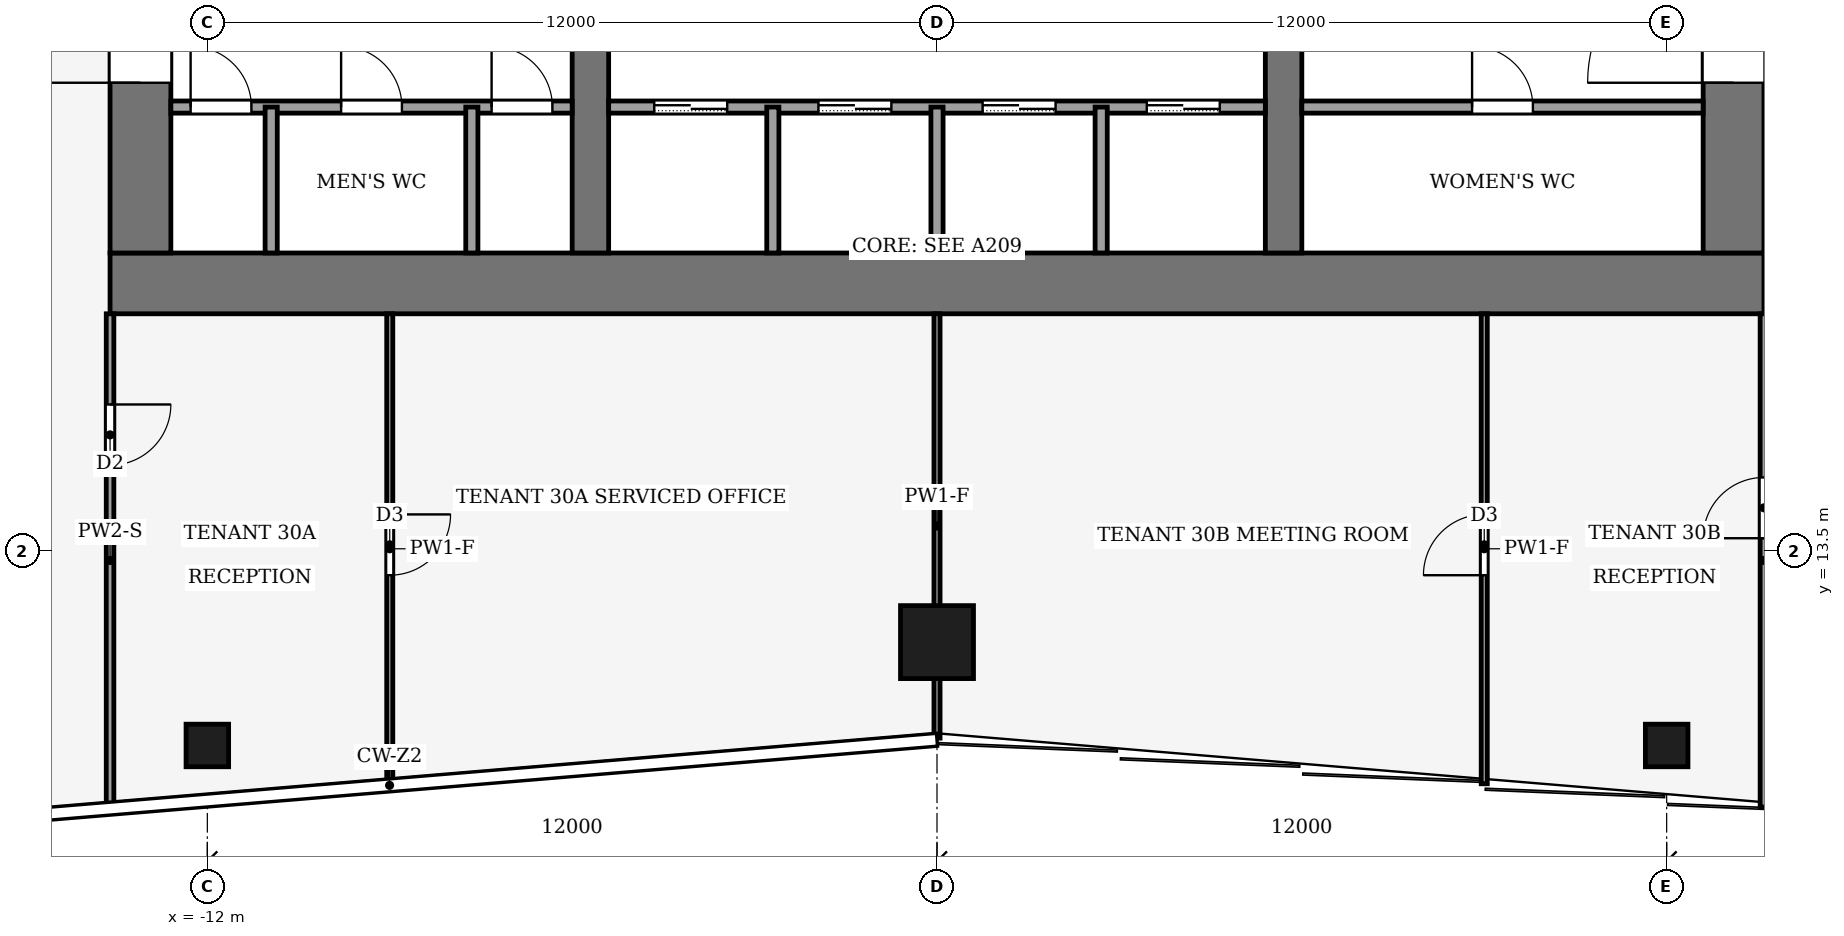
"""IFC4 building model, lengths in metres.
Left out: names, types, materials, properties, quantities, classifications, styles, units other than length and angle.
Written with IfcOpenShell. Run it as: python <this file> out.ifc"""

import sys

from ifc_helpers import new_model, si_unit, direction, frame, frame_2d, origin, origin_2d, place, context, subcontext, project, spatial, rectangle, hollow_rectangle, extrude, element, fill, save


model = new_model("IFC4")
c1 = context("Model", 3, precision=1e-05, world=origin(), true_north=direction((0.0, 1.0)))
c2 = subcontext(c1, "Body", "Model", "MODEL_VIEW")
j1 = project(units=[si_unit("LENGTHUNIT", "METRE"), si_unit("PLANEANGLEUNIT", "RADIAN")], contexts=[c1])
p1 = place(None, origin())
s1 = spatial("IfcSite", under=j1, at=p1, CompositionType="ELEMENT")
p2 = place(p1, origin())
s2 = spatial("IfcBuilding", under=s1, at=p2, CompositionType="ELEMENT")
p3 = place(p2, frame((0.0, 0.0, 134.0)))
s3 = spatial("IfcBuildingStorey", under=s2, at=p3, CompositionType="ELEMENT", Elevation=134.0)
p4 = place(p3, frame((-13.6, 17.9, -0.13), z_axis=(0.0, 0.0, 1.0), x_axis=(1.0, 0.0, 0.0)))
e1 = element("IfcWall", 1, at=p4, inside=s3, PredefinedType="SHEAR", context=c2, shape_type="SweptSolid", body=[
    extrude(rectangle(XDim=27.2, YDim=1.0, at=frame_2d((13.6, 0.0))), origin(), (0.0, 0.0, 1.0), 4.0),
])
p5 = place(p3, frame((-13.1, 18.4, -0.13), z_axis=(0.0, 0.0, 1.0), x_axis=(0.0, 1.0, 0.0)))
e2 = element("IfcWall", 2, at=p5, inside=s3, PredefinedType="SHEAR", context=c2, shape_type="SweptSolid", body=[
    extrude(rectangle(XDim=19.2, YDim=1.0, at=frame_2d((9.6, 0.0))), origin(), (0.0, 0.0, 1.0), 4.0),
])
p6 = place(p5, frame((2.8, 0.0, 0.13)))
e3 = element("IfcOpeningElement", 3, at=p6, cuts=e2, PredefinedType="OPENING", context=c2, shape_type="SweptSolid", body=[
    extrude(rectangle(XDim=2.4, YDim=2.4, at=frame_2d((1.2, 1.2))), frame((0.0, 0.51, 0.0), z_axis=(0.0, -1.0, 0.0), x_axis=(1.0, 0.0, 0.0)), (0.0, 0.0, 1.0), 1.02),
])
p7 = place(p5, frame((13.4, 0.0, 0.13)))
e4 = element("IfcOpeningElement", 4, at=p7, cuts=e2, PredefinedType="OPENING", context=c2, shape_type="SweptSolid", body=[
    extrude(rectangle(XDim=1.4, YDim=2.2, at=frame_2d((0.7, 1.1))), frame((0.0, 0.51, 0.0), z_axis=(0.0, -1.0, 0.0), x_axis=(1.0, 0.0, 0.0)), (0.0, 0.0, 1.0), 1.02),
])
p8 = place(p3, frame((13.1, 18.4, -0.13), z_axis=(0.0, 0.0, 1.0), x_axis=(0.0, 1.0, 0.0)))
e5 = element("IfcWall", 5, at=p8, inside=s3, PredefinedType="SHEAR", context=c2, shape_type="SweptSolid", body=[
    extrude(rectangle(XDim=19.2, YDim=1.0, at=frame_2d((9.6, 0.0))), origin(), (0.0, 0.0, 1.0), 4.0),
])
p9 = place(p8, frame((2.8, 0.0, 0.13)))
e6 = element("IfcOpeningElement", 6, at=p9, cuts=e5, PredefinedType="OPENING", context=c2, shape_type="SweptSolid", body=[
    extrude(rectangle(XDim=2.4, YDim=2.4, at=frame_2d((1.2, 1.2))), frame((0.0, 0.51, 0.0), z_axis=(0.0, -1.0, 0.0), x_axis=(1.0, 0.0, 0.0)), (0.0, 0.0, 1.0), 1.02),
])
p10 = place(p8, frame((13.3, 0.0, 0.13)))
e7 = element("IfcOpeningElement", 7, at=p10, cuts=e5, PredefinedType="OPENING", context=c2, shape_type="SweptSolid", body=[
    extrude(rectangle(XDim=2.4, YDim=2.4, at=frame_2d((1.2, 1.2))), frame((0.0, 0.51, 0.0), z_axis=(0.0, -1.0, 0.0), x_axis=(1.0, 0.0, 0.0)), (0.0, 0.0, 1.0), 1.02),
])
p11 = place(p3, frame((-5.7, 18.4, -0.13), z_axis=(0.0, 0.0, 1.0), x_axis=(0.0, 1.0, 0.0)))
e8 = element("IfcWall", 8, at=p11, inside=s3, PredefinedType="SHEAR", context=c2, shape_type="SweptSolid", body=[
    extrude(rectangle(XDim=19.2, YDim=0.6, at=frame_2d((9.6, 0.0))), origin(), (0.0, 0.0, 1.0), 4.0),
])
p12 = place(p11, frame((8.35, 0.0, 0.13)))
e9 = element("IfcOpeningElement", 9, at=p12, cuts=e8, PredefinedType="OPENING", context=c2, shape_type="SweptSolid", body=[
    extrude(rectangle(XDim=0.9, YDim=2.1, at=frame_2d((0.45, 1.05))), frame((0.0, 0.31, 0.0), z_axis=(0.0, -1.0, 0.0), x_axis=(1.0, 0.0, 0.0)), (0.0, 0.0, 1.0), 0.62),
])
p13 = place(p3, frame((5.7, 18.4, -0.13), z_axis=(0.0, 0.0, 1.0), x_axis=(0.0, 1.0, 0.0)))
e10 = element("IfcWall", 10, at=p13, inside=s3, PredefinedType="SHEAR", context=c2, shape_type="SweptSolid", body=[
    extrude(rectangle(XDim=19.2, YDim=0.6, at=frame_2d((9.6, 0.0))), origin(), (0.0, 0.0, 1.0), 4.0),
])
p14 = place(p13, frame((8.35, 0.0, 0.13)))
e11 = element("IfcOpeningElement", 11, at=p14, cuts=e10, PredefinedType="OPENING", context=c2, shape_type="SweptSolid", body=[
    extrude(rectangle(XDim=0.9, YDim=2.1, at=frame_2d((0.45, 1.05))), frame((0.0, 0.31, 0.0), z_axis=(0.0, -1.0, 0.0), x_axis=(1.0, 0.0, 0.0)), (0.0, 0.0, 1.0), 0.62),
])
p15 = place(p13, frame((13.3, 0.0, 0.13)))
e12 = element("IfcOpeningElement", 12, at=p15, cuts=e10, PredefinedType="OPENING", context=c2, shape_type="SweptSolid", body=[
    extrude(rectangle(XDim=2.4, YDim=2.4, at=frame_2d((1.2, 1.2))), frame((0.0, 0.31, 0.0), z_axis=(0.0, -1.0, 0.0), x_axis=(1.0, 0.0, 0.0)), (0.0, 0.0, 1.0), 0.62),
])
p16 = place(p3, frame((0.0, 12.0, 0.0), z_axis=(0.0, 0.0, 1.0), x_axis=(1.0, 0.0, 0.0)))
e13 = element("IfcColumn", 13, at=p16, inside=s3, PredefinedType="COLUMN", context=c2, shape_type="SweptSolid", body=[
    extrude(hollow_rectangle(XDim=1.2, YDim=1.2, WallThickness=0.07, at=origin_2d()), origin(), (0.0, 0.0, 1.0), 4.0),
])
for number, where, z_axis, x_axis in (
    (14, (-12.0, 10.3, 0.0), (0.0, 0.0, 1.0), (1.0, 0.0, 0.0)),
    (15, (12.0, 10.3, 0.0), (0.0, 0.0, 1.0), (1.0, 0.0, 0.0)),
):
    element("IfcColumn", number, at=place(p3, frame(where, z_axis=z_axis, x_axis=x_axis)), inside=s3, PredefinedType="COLUMN", context=c2, shape_type="SweptSolid", body=[
        extrude(hollow_rectangle(XDim=0.7, YDim=0.7, WallThickness=0.03, at=origin_2d()), origin(), (0.0, 0.0, 1.0), 4.0),
    ])
p17 = place(p3, frame((-12.6, 20.8, 0.0), z_axis=(0.0, 0.0, 1.0), x_axis=(1.0, 0.0, 0.0)))
e16 = element("IfcWall", 16, at=p17, inside=s3, PredefinedType="PARTITIONING", context=c2, shape_type="SweptSolid", body=[
    extrude(rectangle(XDim=6.6, YDim=0.2, at=frame_2d((3.3, 0.0))), origin(), (0.0, 0.0, 1.0), 3.87),
])
p18 = place(p17, frame((0.325, 0.0, 0.0)))
e17 = element("IfcOpeningElement", 17, at=p18, cuts=e16, PredefinedType="OPENING", context=c2, shape_type="SweptSolid", body=[
    extrude(rectangle(XDim=1.0, YDim=2.1, at=frame_2d((0.5, 1.05))), frame((0.0, 0.11, 0.0), z_axis=(0.0, -1.0, 0.0), x_axis=(1.0, 0.0, 0.0)), (0.0, 0.0, 1.0), 0.22),
])
p19 = place(p17, frame((2.8, 0.0, 0.0)))
e18 = element("IfcOpeningElement", 18, at=p19, cuts=e16, PredefinedType="OPENING", context=c2, shape_type="SweptSolid", body=[
    extrude(rectangle(XDim=1.0, YDim=2.1, at=frame_2d((0.5, 1.05))), frame((0.0, 0.11, 0.0), z_axis=(0.0, -1.0, 0.0), x_axis=(1.0, 0.0, 0.0)), (0.0, 0.0, 1.0), 0.22),
])
p20 = place(p17, frame((5.275, 0.0, 0.0)))
e19 = element("IfcOpeningElement", 19, at=p20, cuts=e16, PredefinedType="OPENING", context=c2, shape_type="SweptSolid", body=[
    extrude(rectangle(XDim=1.0, YDim=2.1, at=frame_2d((0.5, 1.05))), frame((0.0, 0.11, 0.0), z_axis=(0.0, -1.0, 0.0), x_axis=(1.0, 0.0, 0.0)), (0.0, 0.0, 1.0), 0.22),
])
p21 = place(p3, frame((-5.4, 20.8, 0.0), z_axis=(0.0, 0.0, 1.0), x_axis=(1.0, 0.0, 0.0)))
e20 = element("IfcWall", 20, at=p21, inside=s3, PredefinedType="PARTITIONING", context=c2, shape_type="SweptSolid", body=[
    extrude(rectangle(XDim=10.8, YDim=0.2, at=frame_2d((5.4, 0.0))), origin(), (0.0, 0.0, 1.0), 3.87),
])
p22 = place(p21, frame((0.75, 0.0, 0.0)))
e21 = element("IfcOpeningElement", 21, at=p22, cuts=e20, PredefinedType="OPENING", context=c2, shape_type="SweptSolid", body=[
    extrude(rectangle(XDim=1.2, YDim=2.2, at=frame_2d((0.6, 1.1))), frame((0.0, 0.11, 0.0), z_axis=(0.0, -1.0, 0.0), x_axis=(1.0, 0.0, 0.0)), (0.0, 0.0, 1.0), 0.22),
])
p23 = place(p21, frame((3.45, 0.0, 0.0)))
e22 = element("IfcOpeningElement", 22, at=p23, cuts=e20, PredefinedType="OPENING", context=c2, shape_type="SweptSolid", body=[
    extrude(rectangle(XDim=1.2, YDim=2.2, at=frame_2d((0.6, 1.1))), frame((0.0, 0.11, 0.0), z_axis=(0.0, -1.0, 0.0), x_axis=(1.0, 0.0, 0.0)), (0.0, 0.0, 1.0), 0.22),
])
p24 = place(p21, frame((6.15, 0.0, 0.0)))
e23 = element("IfcOpeningElement", 23, at=p24, cuts=e20, PredefinedType="OPENING", context=c2, shape_type="SweptSolid", body=[
    extrude(rectangle(XDim=1.2, YDim=2.2, at=frame_2d((0.6, 1.1))), frame((0.0, 0.11, 0.0), z_axis=(0.0, -1.0, 0.0), x_axis=(1.0, 0.0, 0.0)), (0.0, 0.0, 1.0), 0.22),
])
p25 = place(p21, frame((8.85, 0.0, 0.0)))
e24 = element("IfcOpeningElement", 24, at=p25, cuts=e20, PredefinedType="OPENING", context=c2, shape_type="SweptSolid", body=[
    extrude(rectangle(XDim=1.2, YDim=2.2, at=frame_2d((0.6, 1.1))), frame((0.0, 0.11, 0.0), z_axis=(0.0, -1.0, 0.0), x_axis=(1.0, 0.0, 0.0)), (0.0, 0.0, 1.0), 0.22),
])
p26 = place(p3, frame((6.0, 20.8, 0.0), z_axis=(0.0, 0.0, 1.0), x_axis=(1.0, 0.0, 0.0)))
e25 = element("IfcWall", 25, at=p26, inside=s3, PredefinedType="PARTITIONING", context=c2, shape_type="SweptSolid", body=[
    extrude(rectangle(XDim=6.6, YDim=0.2, at=frame_2d((3.3, 0.0))), origin(), (0.0, 0.0, 1.0), 3.87),
])
p27 = place(p26, frame((2.8, 0.0, 0.0)))
e26 = element("IfcOpeningElement", 26, at=p27, cuts=e25, PredefinedType="OPENING", context=c2, shape_type="SweptSolid", body=[
    extrude(rectangle(XDim=1.0, YDim=2.1, at=frame_2d((0.5, 1.05))), frame((0.0, 0.11, 0.0), z_axis=(0.0, -1.0, 0.0), x_axis=(1.0, 0.0, 0.0)), (0.0, 0.0, 1.0), 0.22),
])
for number, where, z_axis, x_axis in (
    (27, (-10.95, 18.4, 0.0), (0.0, 0.0, 1.0), (0.0, 1.0, 0.0)),
    (28, (-7.65, 18.4, 0.0), (0.0, 0.0, 1.0), (0.0, 1.0, 0.0)),
    (29, (-2.7, 18.4, 0.0), (0.0, 0.0, 1.0), (0.0, 1.0, 0.0)),
    (30, (0.0, 18.4, 0.0), (0.0, 0.0, 1.0), (0.0, 1.0, 0.0)),
    (31, (2.7, 18.4, 0.0), (0.0, 0.0, 1.0), (0.0, 1.0, 0.0)),
):
    element("IfcWall", number, at=place(p3, frame(where, z_axis=z_axis, x_axis=x_axis)), inside=s3, PredefinedType="PARTITIONING", context=c2, shape_type="SweptSolid", body=[
        extrude(rectangle(XDim=2.4, YDim=0.2, at=frame_2d((1.2, 0.0))), origin(), (0.0, 0.0, 1.0), 3.87),
    ])
p28 = place(p3, frame((-13.6, 17.4, 0.0), z_axis=(0.0, 0.0, 1.0), x_axis=(0.0, -1.0, 0.0)))
e32 = element("IfcWall", 32, at=p28, inside=s3, PredefinedType="PARTITIONING", context=c2, shape_type="SweptSolid", body=[
    extrude(rectangle(XDim=8.113, YDim=0.125, at=frame_2d((4.057, 0.0))), origin(), (0.0, 0.0, 1.0), 3.04),
])
p29 = place(p28, frame((1.492, 0.0, 0.0)))
e33 = element("IfcOpeningElement", 33, at=p29, cuts=e32, PredefinedType="OPENING", context=c2, shape_type="SweptSolid", body=[
    extrude(rectangle(XDim=1.0, YDim=2.1, at=frame_2d((0.5, 1.05))), frame((0.0, 0.073, 0.0), z_axis=(0.0, -1.0, 0.0), x_axis=(1.0, 0.0, 0.0)), (0.0, 0.0, 1.0), 0.145),
])
p30 = place(p3, frame((13.6, 9.287, 0.0), z_axis=(0.0, 0.0, 1.0), x_axis=(0.0, 1.0, 0.0)))
e34 = element("IfcWall", 34, at=p30, inside=s3, PredefinedType="PARTITIONING", context=c2, shape_type="SweptSolid", body=[
    extrude(rectangle(XDim=8.113, YDim=0.125, at=frame_2d((4.057, 0.0))), origin(), (0.0, 0.0, 1.0), 3.04),
])
p31 = place(p30, frame((4.422, 0.0, 0.0)))
e35 = element("IfcOpeningElement", 35, at=p31, cuts=e34, PredefinedType="OPENING", context=c2, shape_type="SweptSolid", body=[
    extrude(rectangle(XDim=1.0, YDim=2.1, at=frame_2d((0.5, 1.05))), frame((0.0, 0.073, 0.0), z_axis=(0.0, -1.0, 0.0), x_axis=(1.0, 0.0, 0.0)), (0.0, 0.0, 1.0), 0.145),
])
p32 = place(p3, frame((-9.0, 17.4, 0.0), z_axis=(0.0, 0.0, 1.0), x_axis=(0.0, -1.0, 0.0)))
e36 = element("IfcWall", 36, at=p32, inside=s3, PredefinedType="PARTITIONING", context=c2, shape_type="SweptSolid", body=[
    extrude(rectangle(XDim=7.73, YDim=0.1, at=frame_2d((3.865, 0.0))), origin(), (0.0, 0.0, 1.0), 3.04),
])
p33 = place(p32, frame((3.3, 0.0, 0.0)))
e37 = element("IfcOpeningElement", 37, at=p33, cuts=e36, PredefinedType="OPENING", context=c2, shape_type="SweptSolid", body=[
    extrude(rectangle(XDim=1.0, YDim=2.1, at=frame_2d((0.5, 1.05))), frame((0.0, 0.06, 0.0), z_axis=(0.0, -1.0, 0.0), x_axis=(1.0, 0.0, 0.0)), (0.0, 0.0, 1.0), 0.12),
])
p34 = place(p3, frame((0.0, 10.42, 0.0), z_axis=(0.0, 0.0, 1.0), x_axis=(0.0, 1.0, 0.0)))
e38 = element("IfcWall", 38, at=p34, inside=s3, PredefinedType="PARTITIONING", context=c2, shape_type="SweptSolid", body=[
    extrude(rectangle(XDim=6.98, YDim=0.1, at=frame_2d((3.49, 0.0))), origin(), (0.0, 0.0, 1.0), 3.04),
])
p35 = place(p3, frame((9.0, 9.67, 0.0), z_axis=(0.0, 0.0, 1.0), x_axis=(0.0, 1.0, 0.0)))
e39 = element("IfcWall", 39, at=p35, inside=s3, PredefinedType="PARTITIONING", context=c2, shape_type="SweptSolid", body=[
    extrude(rectangle(XDim=7.73, YDim=0.1, at=frame_2d((3.865, 0.0))), origin(), (0.0, 0.0, 1.0), 3.04),
])
p36 = place(p35, frame((3.43, 0.0, 0.0)))
e40 = element("IfcOpeningElement", 40, at=p36, cuts=e39, PredefinedType="OPENING", context=c2, shape_type="SweptSolid", body=[
    extrude(rectangle(XDim=1.0, YDim=2.1, at=frame_2d((0.5, 1.05))), frame((0.0, 0.06, 0.0), z_axis=(0.0, -1.0, 0.0), x_axis=(1.0, 0.0, 0.0)), (0.0, 0.0, 1.0), 0.12),
])
p37 = place(p22, origin())
e41 = element("IfcDoor", 41, at=p37, inside=s3, OperationType="SLIDING_TO_LEFT", PredefinedType="DOOR", context=c2, shape_type="SweptSolid", body=[
    extrude(rectangle(XDim=1.2, YDim=2.2, at=frame_2d((0.6, 1.1))), frame((0.0, 0.025, 0.0), z_axis=(0.0, -1.0, 0.0), x_axis=(1.0, 0.0, 0.0)), (0.0, 0.0, 1.0), 0.05),
])
fill(e21, e41)
p38 = place(p23, origin())
e42 = element("IfcDoor", 42, at=p38, inside=s3, OperationType="SLIDING_TO_LEFT", PredefinedType="DOOR", context=c2, shape_type="SweptSolid", body=[
    extrude(rectangle(XDim=1.2, YDim=2.2, at=frame_2d((0.6, 1.1))), frame((0.0, 0.025, 0.0), z_axis=(0.0, -1.0, 0.0), x_axis=(1.0, 0.0, 0.0)), (0.0, 0.0, 1.0), 0.05),
])
fill(e22, e42)
p39 = place(p24, origin())
e43 = element("IfcDoor", 43, at=p39, inside=s3, OperationType="SLIDING_TO_LEFT", PredefinedType="DOOR", context=c2, shape_type="SweptSolid", body=[
    extrude(rectangle(XDim=1.2, YDim=2.2, at=frame_2d((0.6, 1.1))), frame((0.0, 0.025, 0.0), z_axis=(0.0, -1.0, 0.0), x_axis=(1.0, 0.0, 0.0)), (0.0, 0.0, 1.0), 0.05),
])
fill(e23, e43)
p40 = place(p25, origin())
e44 = element("IfcDoor", 44, at=p40, inside=s3, OperationType="SLIDING_TO_LEFT", PredefinedType="DOOR", context=c2, shape_type="SweptSolid", body=[
    extrude(rectangle(XDim=1.2, YDim=2.2, at=frame_2d((0.6, 1.1))), frame((0.0, 0.025, 0.0), z_axis=(0.0, -1.0, 0.0), x_axis=(1.0, 0.0, 0.0)), (0.0, 0.0, 1.0), 0.05),
])
fill(e24, e44)
p41 = place(p18, origin())
e45 = element("IfcDoor", 45, at=p41, inside=s3, OperationType="SINGLE_SWING_RIGHT", PredefinedType="DOOR", context=c2, shape_type="SweptSolid", body=[
    extrude(rectangle(XDim=1.0, YDim=2.1, at=frame_2d((0.5, 1.05))), frame((0.0, 0.025, 0.0), z_axis=(0.0, -1.0, 0.0), x_axis=(1.0, 0.0, 0.0)), (0.0, 0.0, 1.0), 0.05),
])
fill(e17, e45)
p42 = place(p19, origin())
e46 = element("IfcDoor", 46, at=p42, inside=s3, OperationType="SINGLE_SWING_RIGHT", PredefinedType="DOOR", context=c2, shape_type="SweptSolid", body=[
    extrude(rectangle(XDim=1.0, YDim=2.1, at=frame_2d((0.5, 1.05))), frame((0.0, 0.025, 0.0), z_axis=(0.0, -1.0, 0.0), x_axis=(1.0, 0.0, 0.0)), (0.0, 0.0, 1.0), 0.05),
])
fill(e18, e46)
p43 = place(p20, origin())
e47 = element("IfcDoor", 47, at=p43, inside=s3, OperationType="SINGLE_SWING_RIGHT", PredefinedType="DOOR", context=c2, shape_type="SweptSolid", body=[
    extrude(rectangle(XDim=1.0, YDim=2.1, at=frame_2d((0.5, 1.05))), frame((0.0, 0.025, 0.0), z_axis=(0.0, -1.0, 0.0), x_axis=(1.0, 0.0, 0.0)), (0.0, 0.0, 1.0), 0.05),
])
fill(e19, e47)
p44 = place(p27, origin())
e48 = element("IfcDoor", 48, at=p44, inside=s3, OperationType="SINGLE_SWING_RIGHT", PredefinedType="DOOR", context=c2, shape_type="SweptSolid", body=[
    extrude(rectangle(XDim=1.0, YDim=2.1, at=frame_2d((0.5, 1.05))), frame((0.0, 0.025, 0.0), z_axis=(0.0, -1.0, 0.0), x_axis=(1.0, 0.0, 0.0)), (0.0, 0.0, 1.0), 0.05),
])
fill(e26, e48)
p45 = place(p6, origin())
e49 = element("IfcDoor", 49, at=p45, inside=s3, OperationType="DOUBLE_DOOR_SINGLE_SWING", PredefinedType="DOOR", context=c2, shape_type="SweptSolid", body=[
    extrude(rectangle(XDim=2.4, YDim=2.4, at=frame_2d((1.2, 1.2))), frame((0.0, 0.025, 0.0), z_axis=(0.0, -1.0, 0.0), x_axis=(1.0, 0.0, 0.0)), (0.0, 0.0, 1.0), 0.05),
])
fill(e3, e49)
p46 = place(p9, origin())
e50 = element("IfcDoor", 50, at=p46, inside=s3, OperationType="DOUBLE_DOOR_SINGLE_SWING", PredefinedType="DOOR", context=c2, shape_type="SweptSolid", body=[
    extrude(rectangle(XDim=2.4, YDim=2.4, at=frame_2d((1.2, 1.2))), frame((0.0, 0.025, 0.0), z_axis=(0.0, -1.0, 0.0), x_axis=(1.0, 0.0, 0.0)), (0.0, 0.0, 1.0), 0.05),
])
fill(e6, e50)
p47 = place(p29, origin())
e51 = element("IfcDoor", 51, at=p47, inside=s3, OperationType="SINGLE_SWING_LEFT", PredefinedType="DOOR", context=c2, shape_type="SweptSolid", body=[
    extrude(rectangle(XDim=1.0, YDim=2.1, at=frame_2d((0.5, 1.05))), frame((0.0, 0.025, 0.0), z_axis=(0.0, -1.0, 0.0), x_axis=(1.0, 0.0, 0.0)), (0.0, 0.0, 1.0), 0.05),
])
fill(e33, e51)
p48 = place(p31, origin())
e52 = element("IfcDoor", 52, at=p48, inside=s3, OperationType="SINGLE_SWING_RIGHT", PredefinedType="DOOR", context=c2, shape_type="SweptSolid", body=[
    extrude(rectangle(XDim=1.0, YDim=2.1, at=frame_2d((0.5, 1.05))), frame((0.0, 0.025, 0.0), z_axis=(0.0, -1.0, 0.0), x_axis=(1.0, 0.0, 0.0)), (0.0, 0.0, 1.0), 0.05),
])
fill(e35, e52)
p49 = place(p33, origin())
e53 = element("IfcDoor", 53, at=p49, inside=s3, OperationType="SINGLE_SWING_LEFT", PredefinedType="DOOR", context=c2, shape_type="SweptSolid", body=[
    extrude(rectangle(XDim=1.0, YDim=2.1, at=frame_2d((0.5, 1.05))), frame((0.0, 0.025, 0.0), z_axis=(0.0, -1.0, 0.0), x_axis=(1.0, 0.0, 0.0)), (0.0, 0.0, 1.0), 0.05),
])
fill(e37, e53)
p50 = place(p36, origin())
e54 = element("IfcDoor", 54, at=p50, inside=s3, OperationType="SINGLE_SWING_RIGHT", PredefinedType="DOOR", context=c2, shape_type="SweptSolid", body=[
    extrude(rectangle(XDim=1.0, YDim=2.1, at=frame_2d((0.5, 1.05))), frame((0.0, 0.025, 0.0), z_axis=(0.0, -1.0, 0.0), x_axis=(1.0, 0.0, 0.0)), (0.0, 0.0, 1.0), 0.05),
])
fill(e40, e54)
save(model, sys.argv[1])
